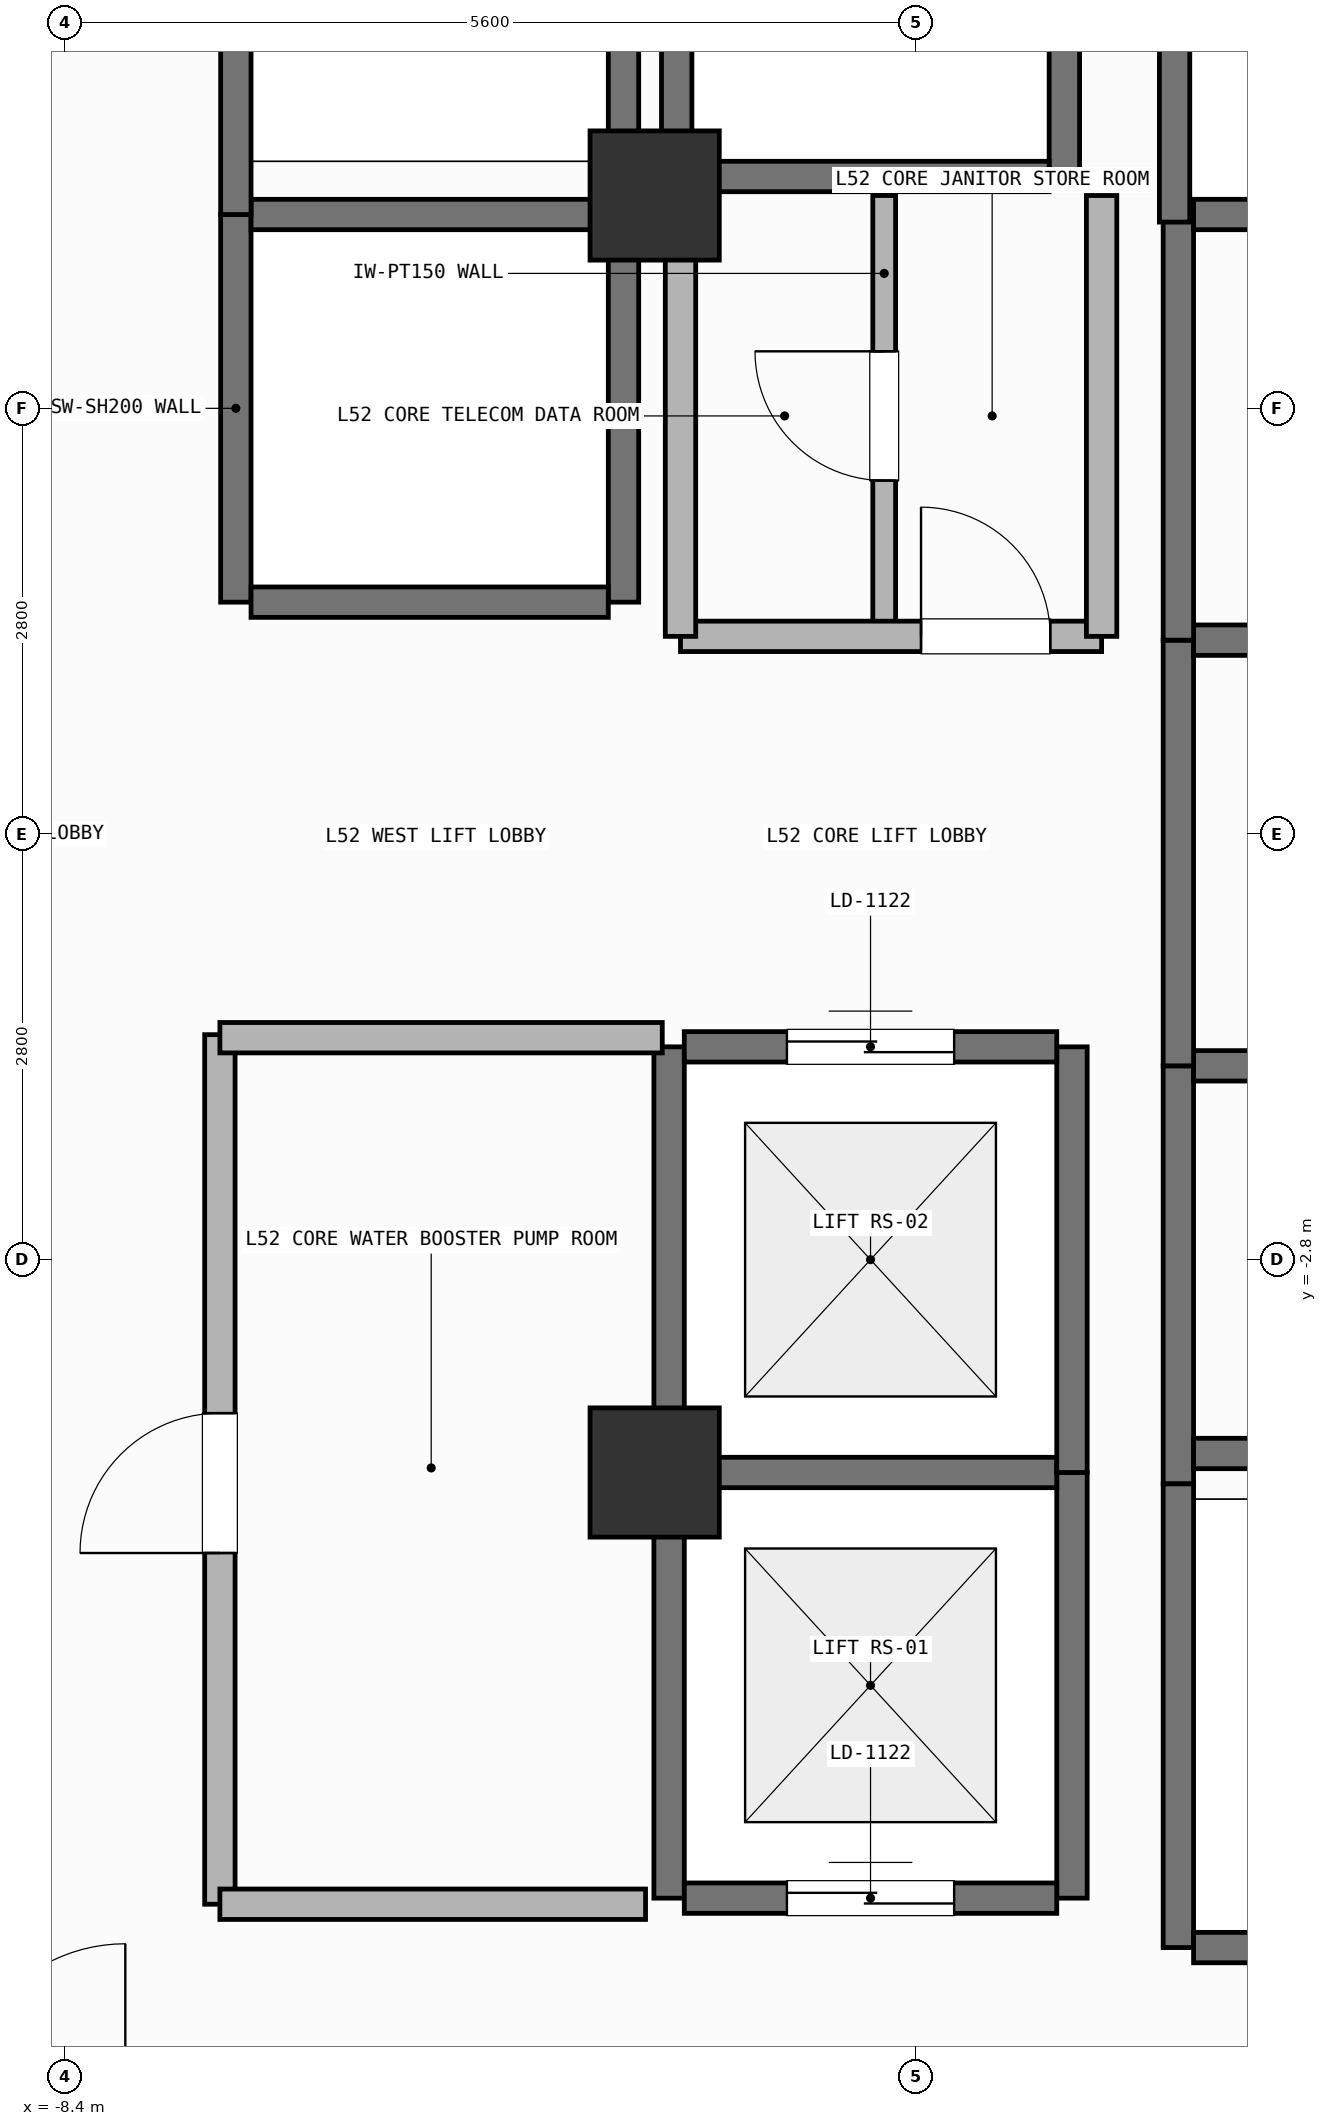
"""IFC4 building model, lengths in metres.
Left out: names, types, materials, properties, quantities, classifications, styles, units other than length and angle.
Written with IfcOpenShell. Run it as: python <this file> out.ifc"""

import sys

from ifc_helpers import new_model, si_unit, direction, frame, frame_2d, origin, origin_2d, place, context, subcontext, project, spatial, rectangle, extrude, element, fill, save


model = new_model("IFC4")
c1 = context("Model", 3, precision=1e-05, world=origin(), true_north=direction((0.0, 1.0)))
c2 = subcontext(c1, "Body", "Model", "MODEL_VIEW")
j1 = project(units=[si_unit("LENGTHUNIT", "METRE"), si_unit("PLANEANGLEUNIT", "RADIAN")], contexts=[c1])
p1 = place(None, origin())
s1 = spatial("IfcSite", under=j1, at=p1, CompositionType="ELEMENT")
p2 = place(p1, origin())
s2 = spatial("IfcBuilding", under=s1, at=p2, CompositionType="ELEMENT")
p3 = place(p2, frame((0.0, 0.0, 210.9)))
s3 = spatial("IfcBuildingStorey", under=s2, at=p3, CompositionType="ELEMENT", Elevation=210.9)
for number, where, z_axis, x_axis in (
    (1, (-4.52, -4.2, 0.0), (0.0, 0.0, 1.0), (1.0, 0.0, 0.0)),
    (2, (-4.52, 4.2, 0.0), (0.0, 0.0, 1.0), (1.0, 0.0, 0.0)),
):
    element("IfcColumn", number, at=place(p3, frame(where, z_axis=z_axis, x_axis=x_axis)), inside=s3, PredefinedType="COLUMN", context=c2, shape_type="SweptSolid", body=[
        extrude(rectangle(XDim=0.85, YDim=0.85, at=origin_2d()), origin(), (0.0, 0.0, 1.0), 4.8),
    ])
for number, where, z_axis, x_axis in (
    (3, (-7.275, 1.525, 0.0), (0.0, 0.0, 1.0), (0.0, 1.0, 0.0)),
    (4, (-4.725, 1.525, 0.0), (0.0, 0.0, 1.0), (0.0, 1.0, 0.0)),
):
    element("IfcWall", number, at=place(p3, frame(where, z_axis=z_axis, x_axis=x_axis)), inside=s3, PredefinedType="SHEAR", context=c2, shape_type="SweptSolid", body=[
        extrude(rectangle(XDim=2.55, YDim=0.2, at=frame_2d((1.275, 0.0))), origin(), (0.0, 0.0, 1.0), 4.58),
    ])
for number, where, z_axis, x_axis in (
    (5, (-7.175, 1.525, 0.0), (0.0, 0.0, 1.0), (1.0, 0.0, 0.0)),
    (6, (-7.175, 4.075, 0.0), (0.0, 0.0, 1.0), (1.0, 0.0, 0.0)),
):
    element("IfcWall", number, at=place(p3, frame(where, z_axis=z_axis, x_axis=x_axis)), inside=s3, PredefinedType="SHEAR", context=c2, shape_type="SweptSolid", body=[
        extrude(rectangle(XDim=2.35, YDim=0.2, at=frame_2d((1.175, 0.0))), origin(), (0.0, 0.0, 1.0), 4.58),
    ])
for number, where, z_axis, x_axis in (
    (7, (-7.275, 4.075, 0.0), (0.0, 0.0, 1.0), (0.0, 1.0, 0.0)),
    (8, (-4.725, 4.075, 0.0), (0.0, 0.0, 1.0), (0.0, 1.0, 0.0)),
):
    element("IfcWall", number, at=place(p3, frame(where, z_axis=z_axis, x_axis=x_axis)), inside=s3, PredefinedType="SHEAR", context=c2, shape_type="SweptSolid", body=[
        extrude(rectangle(XDim=2.8, YDim=0.2, at=frame_2d((1.4, 0.0))), origin(), (0.0, 0.0, 1.0), 4.58),
    ])
for number, where, z_axis, x_axis in (
    (9, (-4.375, 4.325, 0.0), (0.0, 0.0, 1.0), (0.0, 1.0, 0.0)),
    (10, (-1.825, 4.325, 0.0), (0.0, 0.0, 1.0), (0.0, 1.0, 0.0)),
):
    element("IfcWall", number, at=place(p3, frame(where, z_axis=z_axis, x_axis=x_axis)), inside=s3, PredefinedType="SHEAR", context=c2, shape_type="SweptSolid", body=[
        extrude(rectangle(XDim=2.55, YDim=0.2, at=frame_2d((1.275, 0.0))), origin(), (0.0, 0.0, 1.0), 4.58),
    ])
p4 = place(p3, frame((-4.275, 4.325, 0.0), z_axis=(0.0, 0.0, 1.0), x_axis=(1.0, 0.0, 0.0)))
e11 = element("IfcWall", 11, at=p4, inside=s3, PredefinedType="SHEAR", context=c2, shape_type="SweptSolid", body=[
    extrude(rectangle(XDim=2.35, YDim=0.2, at=frame_2d((1.175, 0.0))), origin(), (0.0, 0.0, 1.0), 4.58),
])
for number, where, z_axis, x_axis in (
    (12, (-4.425, -7.0, 0.0), (0.0, 0.0, 1.0), (0.0, 1.0, 0.0)),
    (13, (-1.775, -7.0, 0.0), (0.0, 0.0, 1.0), (0.0, 1.0, 0.0)),
):
    element("IfcWall", number, at=place(p3, frame(where, z_axis=z_axis, x_axis=x_axis)), inside=s3, PredefinedType="SHEAR", context=c2, shape_type="SweptSolid", body=[
        extrude(rectangle(XDim=2.8, YDim=0.2, at=frame_2d((1.4, 0.0))), origin(), (0.0, 0.0, 1.0), 4.58),
    ])
p5 = place(p3, frame((-4.325, -7.0, 0.0), z_axis=(0.0, 0.0, 1.0), x_axis=(1.0, 0.0, 0.0)))
e14 = element("IfcWall", 14, at=p5, inside=s3, PredefinedType="SHEAR", context=c2, shape_type="SweptSolid", body=[
    extrude(rectangle(XDim=2.45, YDim=0.2, at=frame_2d((1.225, 0.0))), origin(), (0.0, 0.0, 1.0), 4.58),
])
p6 = place(p5, frame((0.675, 0.0, 0.0)))
e15 = element("IfcOpeningElement", 15, at=p6, cuts=e14, PredefinedType="OPENING", context=c2, shape_type="SweptSolid", body=[
    extrude(rectangle(XDim=1.1, YDim=2.2, at=frame_2d((0.55, 1.1))), frame((0.0, 0.11, 0.0), z_axis=(0.0, -1.0, 0.0), x_axis=(1.0, 0.0, 0.0)), (0.0, 0.0, 1.0), 0.22),
])
p7 = place(p3, frame((-4.325, -4.2, 0.0), z_axis=(0.0, 0.0, 1.0), x_axis=(1.0, 0.0, 0.0)))
e16 = element("IfcWall", 16, at=p7, inside=s3, PredefinedType="SHEAR", context=c2, shape_type="SweptSolid", body=[
    extrude(rectangle(XDim=2.45, YDim=0.2, at=frame_2d((1.225, 0.0))), origin(), (0.0, 0.0, 1.0), 4.58),
])
for number, where, z_axis, x_axis in (
    (17, (-4.425, -4.2, 0.0), (0.0, 0.0, 1.0), (0.0, 1.0, 0.0)),
    (18, (-1.775, -4.2, 0.0), (0.0, 0.0, 1.0), (0.0, 1.0, 0.0)),
):
    element("IfcWall", number, at=place(p3, frame(where, z_axis=z_axis, x_axis=x_axis)), inside=s3, PredefinedType="SHEAR", context=c2, shape_type="SweptSolid", body=[
        extrude(rectangle(XDim=2.8, YDim=0.2, at=frame_2d((1.4, 0.0))), origin(), (0.0, 0.0, 1.0), 4.58),
    ])
p8 = place(p3, frame((-4.325, -1.4, 0.0), z_axis=(0.0, 0.0, 1.0), x_axis=(1.0, 0.0, 0.0)))
e19 = element("IfcWall", 19, at=p8, inside=s3, PredefinedType="SHEAR", context=c2, shape_type="SweptSolid", body=[
    extrude(rectangle(XDim=2.45, YDim=0.2, at=frame_2d((1.225, 0.0))), origin(), (0.0, 0.0, 1.0), 4.58),
])
p9 = place(p8, frame((0.675, 0.0, 0.0)))
e20 = element("IfcOpeningElement", 20, at=p9, cuts=e19, PredefinedType="OPENING", context=c2, shape_type="SweptSolid", body=[
    extrude(rectangle(XDim=1.1, YDim=2.2, at=frame_2d((0.55, 1.1))), frame((0.0, 0.11, 0.0), z_axis=(0.0, -1.0, 0.0), x_axis=(1.0, 0.0, 0.0)), (0.0, 0.0, 1.0), 0.22),
])
p10 = place(p3, frame((-1.075, -4.275, 0.0), z_axis=(0.0, 0.0, 1.0), x_axis=(0.0, 1.0, 0.0)))
e21 = element("IfcWall", 21, at=p10, inside=s3, PredefinedType="SHEAR", context=c2, shape_type="SweptSolid", body=[
    extrude(rectangle(XDim=2.75, YDim=0.2, at=frame_2d((1.375, 0.0))), origin(), (0.0, 0.0, 1.0), 4.58),
])
for number, where, z_axis, x_axis in (
    (22, (-0.975, -4.075, 0.0), (0.0, 0.0, 1.0), (1.0, 0.0, 0.0)),
    (23, (-0.975, -1.525, 0.0), (0.0, 0.0, 1.0), (1.0, 0.0, 0.0)),
):
    element("IfcWall", number, at=place(p3, frame(where, z_axis=z_axis, x_axis=x_axis)), inside=s3, PredefinedType="SHEAR", context=c2, shape_type="SweptSolid", body=[
        extrude(rectangle(XDim=2.35, YDim=0.2, at=frame_2d((1.175, 0.0))), origin(), (0.0, 0.0, 1.0), 4.58),
    ])
p11 = place(p3, frame((-1.075, -1.525, 0.0), z_axis=(0.0, 0.0, 1.0), x_axis=(0.0, 1.0, 0.0)))
e24 = element("IfcWall", 24, at=p11, inside=s3, PredefinedType="SHEAR", context=c2, shape_type="SweptSolid", body=[
    extrude(rectangle(XDim=2.8, YDim=0.2, at=frame_2d((1.4, 0.0))), origin(), (0.0, 0.0, 1.0), 4.58),
])
p12 = place(p3, frame((-0.975, 1.275, 0.0), z_axis=(0.0, 0.0, 1.0), x_axis=(1.0, 0.0, 0.0)))
e25 = element("IfcWall", 25, at=p12, inside=s3, PredefinedType="SHEAR", context=c2, shape_type="SweptSolid", body=[
    extrude(rectangle(XDim=2.35, YDim=0.2, at=frame_2d((1.175, 0.0))), origin(), (0.0, 0.0, 1.0), 4.58),
])
p13 = place(p3, frame((-1.075, 1.275, 0.0), z_axis=(0.0, 0.0, 1.0), x_axis=(0.0, 1.0, 0.0)))
e26 = element("IfcWall", 26, at=p13, inside=s3, PredefinedType="SHEAR", context=c2, shape_type="SweptSolid", body=[
    extrude(rectangle(XDim=2.8, YDim=0.2, at=frame_2d((1.4, 0.0))), origin(), (0.0, 0.0, 1.0), 4.58),
])
p14 = place(p3, frame((-0.975, 4.075, 0.0), z_axis=(0.0, 0.0, 1.0), x_axis=(1.0, 0.0, 0.0)))
e27 = element("IfcWall", 27, at=p14, inside=s3, PredefinedType="SHEAR", context=c2, shape_type="SweptSolid", body=[
    extrude(rectangle(XDim=2.35, YDim=0.2, at=frame_2d((1.175, 0.0))), origin(), (0.0, 0.0, 1.0), 4.58),
])
p15 = place(p3, frame((-1.1, 4.025, 0.0), z_axis=(0.0, 0.0, 1.0), x_axis=(0.0, 1.0, 0.0)))
e28 = element("IfcWall", 28, at=p15, inside=s3, PredefinedType="SHEAR", context=c2, shape_type="SweptSolid", body=[
    extrude(rectangle(XDim=3.15, YDim=0.2, at=frame_2d((1.575, 0.0))), origin(), (0.0, 0.0, 1.0), 4.58),
])
p16 = place(p3, frame((-1.075, -7.325, 0.0), z_axis=(0.0, 0.0, 1.0), x_axis=(0.0, 1.0, 0.0)))
e29 = element("IfcWall", 29, at=p16, inside=s3, PredefinedType="SHEAR", context=c2, shape_type="SweptSolid", body=[
    extrude(rectangle(XDim=3.05, YDim=0.2, at=frame_2d((1.525, 0.0))), origin(), (0.0, 0.0, 1.0), 4.58),
])
p17 = place(p3, frame((-0.975, -7.325, 0.0), z_axis=(0.0, 0.0, 1.0), x_axis=(1.0, 0.0, 0.0)))
e30 = element("IfcWall", 30, at=p17, inside=s3, PredefinedType="SHEAR", context=c2, shape_type="SweptSolid", body=[
    extrude(rectangle(XDim=2.35, YDim=0.2, at=frame_2d((1.175, 0.0))), origin(), (0.0, 0.0, 1.0), 4.58),
])
p18 = place(p3, frame((-7.38, -7.04, 0.0), z_axis=(0.0, 0.0, 1.0), x_axis=(0.0, 1.0, 0.0)))
e31 = element("IfcWall", 31, at=p18, inside=s3, PredefinedType="SOLIDWALL", context=c2, shape_type="SweptSolid", body=[
    extrude(rectangle(XDim=5.72, YDim=0.2, at=frame_2d((2.86, 0.0))), origin(), (0.0, 0.0, 1.0), 4.58),
])
p19 = place(p18, frame((2.31, 0.0, 0.0)))
e32 = element("IfcOpeningElement", 32, at=p19, cuts=e31, PredefinedType="OPENING", context=c2, shape_type="SweptSolid", body=[
    extrude(rectangle(XDim=0.92, YDim=2.1, at=frame_2d((0.46, 1.05))), frame((0.0, 0.11, 0.0), z_axis=(0.0, -1.0, 0.0), x_axis=(1.0, 0.0, 0.0)), (0.0, 0.0, 1.0), 0.22),
])
p20 = place(p3, frame((-3.01, 1.3, 0.0), z_axis=(0.0, 0.0, 1.0), x_axis=(0.0, 1.0, 0.0)))
e33 = element("IfcWall", 33, at=p20, inside=s3, PredefinedType="PARTITIONING", context=c2, shape_type="SweptSolid", body=[
    extrude(rectangle(XDim=2.9, YDim=0.15, at=frame_2d((1.45, 0.0))), origin(), (0.0, 0.0, 1.0), 4.58),
])
p21 = place(p20, frame((1.025, 0.0, 0.0)))
e34 = element("IfcOpeningElement", 34, at=p21, cuts=e33, PredefinedType="OPENING", context=c2, shape_type="SweptSolid", body=[
    extrude(rectangle(XDim=0.85, YDim=2.1, at=frame_2d((0.425, 1.05))), frame((0.0, 0.085, 0.0), z_axis=(0.0, -1.0, 0.0), x_axis=(1.0, 0.0, 0.0)), (0.0, 0.0, 1.0), 0.17),
])
p22 = place(p3, frame((-4.35, 1.3, 0.0), z_axis=(0.0, 0.0, 1.0), x_axis=(1.0, 0.0, 0.0)))
e35 = element("IfcWall", 35, at=p22, inside=s3, PredefinedType="SOLIDWALL", context=c2, shape_type="SweptSolid", body=[
    extrude(rectangle(XDim=2.77, YDim=0.2, at=frame_2d((1.385, 0.0))), origin(), (0.0, 0.0, 1.0), 4.58),
])
p23 = place(p22, frame((1.582, 0.0, 0.0)))
e36 = element("IfcOpeningElement", 36, at=p23, cuts=e35, PredefinedType="OPENING", context=c2, shape_type="SweptSolid", body=[
    extrude(rectangle(XDim=0.85, YDim=2.1, at=frame_2d((0.425, 1.05))), frame((0.0, 0.11, 0.0), z_axis=(0.0, -1.0, 0.0), x_axis=(1.0, 0.0, 0.0)), (0.0, 0.0, 1.0), 0.22),
])
p24 = place(p3, frame((-7.38, -1.34, 0.0), z_axis=(0.0, 0.0, 1.0), x_axis=(1.0, 0.0, 0.0)))
e37 = element("IfcWall", 37, at=p24, inside=s3, PredefinedType="SOLIDWALL", context=c2, shape_type="SweptSolid", body=[
    extrude(rectangle(XDim=2.91, YDim=0.2, at=frame_2d((1.455, 0.0))), origin(), (0.0, 0.0, 1.0), 4.58),
])
p25 = place(p3, frame((-7.38, -7.04, 0.0), z_axis=(0.0, 0.0, 1.0), x_axis=(1.0, 0.0, 0.0)))
e38 = element("IfcWall", 38, at=p25, inside=s3, PredefinedType="SOLIDWALL", context=c2, shape_type="SweptSolid", body=[
    extrude(rectangle(XDim=2.8, YDim=0.2, at=frame_2d((1.4, 0.0))), origin(), (0.0, 0.0, 1.0), 4.58),
])
for number, where, z_axis, x_axis in (
    (39, (-4.35, 1.3, 0.0), (0.0, 0.0, 1.0), (0.0, 1.0, 0.0)),
    (40, (-1.58, 1.3, 0.0), (0.0, 0.0, 1.0), (0.0, 1.0, 0.0)),
):
    element("IfcWall", number, at=place(p3, frame(where, z_axis=z_axis, x_axis=x_axis)), inside=s3, PredefinedType="SOLIDWALL", context=c2, shape_type="SweptSolid", body=[
        extrude(rectangle(XDim=2.9, YDim=0.2, at=frame_2d((1.45, 0.0))), origin(), (0.0, 0.0, 1.0), 4.58),
    ])
p26 = place(p6, origin())
e41 = element("IfcDoor", 41, at=p26, inside=s3, OperationType="SLIDING_TO_LEFT", PredefinedType="DOOR", context=c2, shape_type="SweptSolid", body=[
    extrude(rectangle(XDim=1.1, YDim=2.2, at=frame_2d((0.55, 1.1))), frame((0.0, 0.025, 0.0), z_axis=(0.0, -1.0, 0.0), x_axis=(1.0, 0.0, 0.0)), (0.0, 0.0, 1.0), 0.05),
])
fill(e15, e41)
p27 = place(p9, origin())
e42 = element("IfcDoor", 42, at=p27, inside=s3, OperationType="SLIDING_TO_LEFT", PredefinedType="DOOR", context=c2, shape_type="SweptSolid", body=[
    extrude(rectangle(XDim=1.1, YDim=2.2, at=frame_2d((0.55, 1.1))), frame((0.0, 0.025, 0.0), z_axis=(0.0, -1.0, 0.0), x_axis=(1.0, 0.0, 0.0)), (0.0, 0.0, 1.0), 0.05),
])
fill(e20, e42)
p28 = place(p19, origin())
e43 = element("IfcDoor", 43, at=p28, inside=s3, OperationType="SINGLE_SWING_LEFT", PredefinedType="DOOR", context=c2, shape_type="SweptSolid", body=[
    extrude(rectangle(XDim=0.92, YDim=2.1, at=frame_2d((0.46, 1.05))), frame((0.0, 0.025, 0.0), z_axis=(0.0, -1.0, 0.0), x_axis=(1.0, 0.0, 0.0)), (0.0, 0.0, 1.0), 0.05),
])
fill(e32, e43)
p29 = place(p21, origin())
e44 = element("IfcDoor", 44, at=p29, inside=s3, OperationType="SINGLE_SWING_RIGHT", PredefinedType="DOOR", context=c2, shape_type="SweptSolid", body=[
    extrude(rectangle(XDim=0.85, YDim=2.1, at=frame_2d((0.425, 1.05))), frame((0.0, 0.025, 0.0), z_axis=(0.0, -1.0, 0.0), x_axis=(1.0, 0.0, 0.0)), (0.0, 0.0, 1.0), 0.05),
])
fill(e34, e44)
p30 = place(p23, origin())
e45 = element("IfcDoor", 45, at=p30, inside=s3, OperationType="SINGLE_SWING_LEFT", PredefinedType="DOOR", context=c2, shape_type="SweptSolid", body=[
    extrude(rectangle(XDim=0.85, YDim=2.1, at=frame_2d((0.425, 1.05))), frame((0.0, 0.025, 0.0), z_axis=(0.0, -1.0, 0.0), x_axis=(1.0, 0.0, 0.0)), (0.0, 0.0, 1.0), 0.05),
])
fill(e36, e45)
save(model, sys.argv[1])
